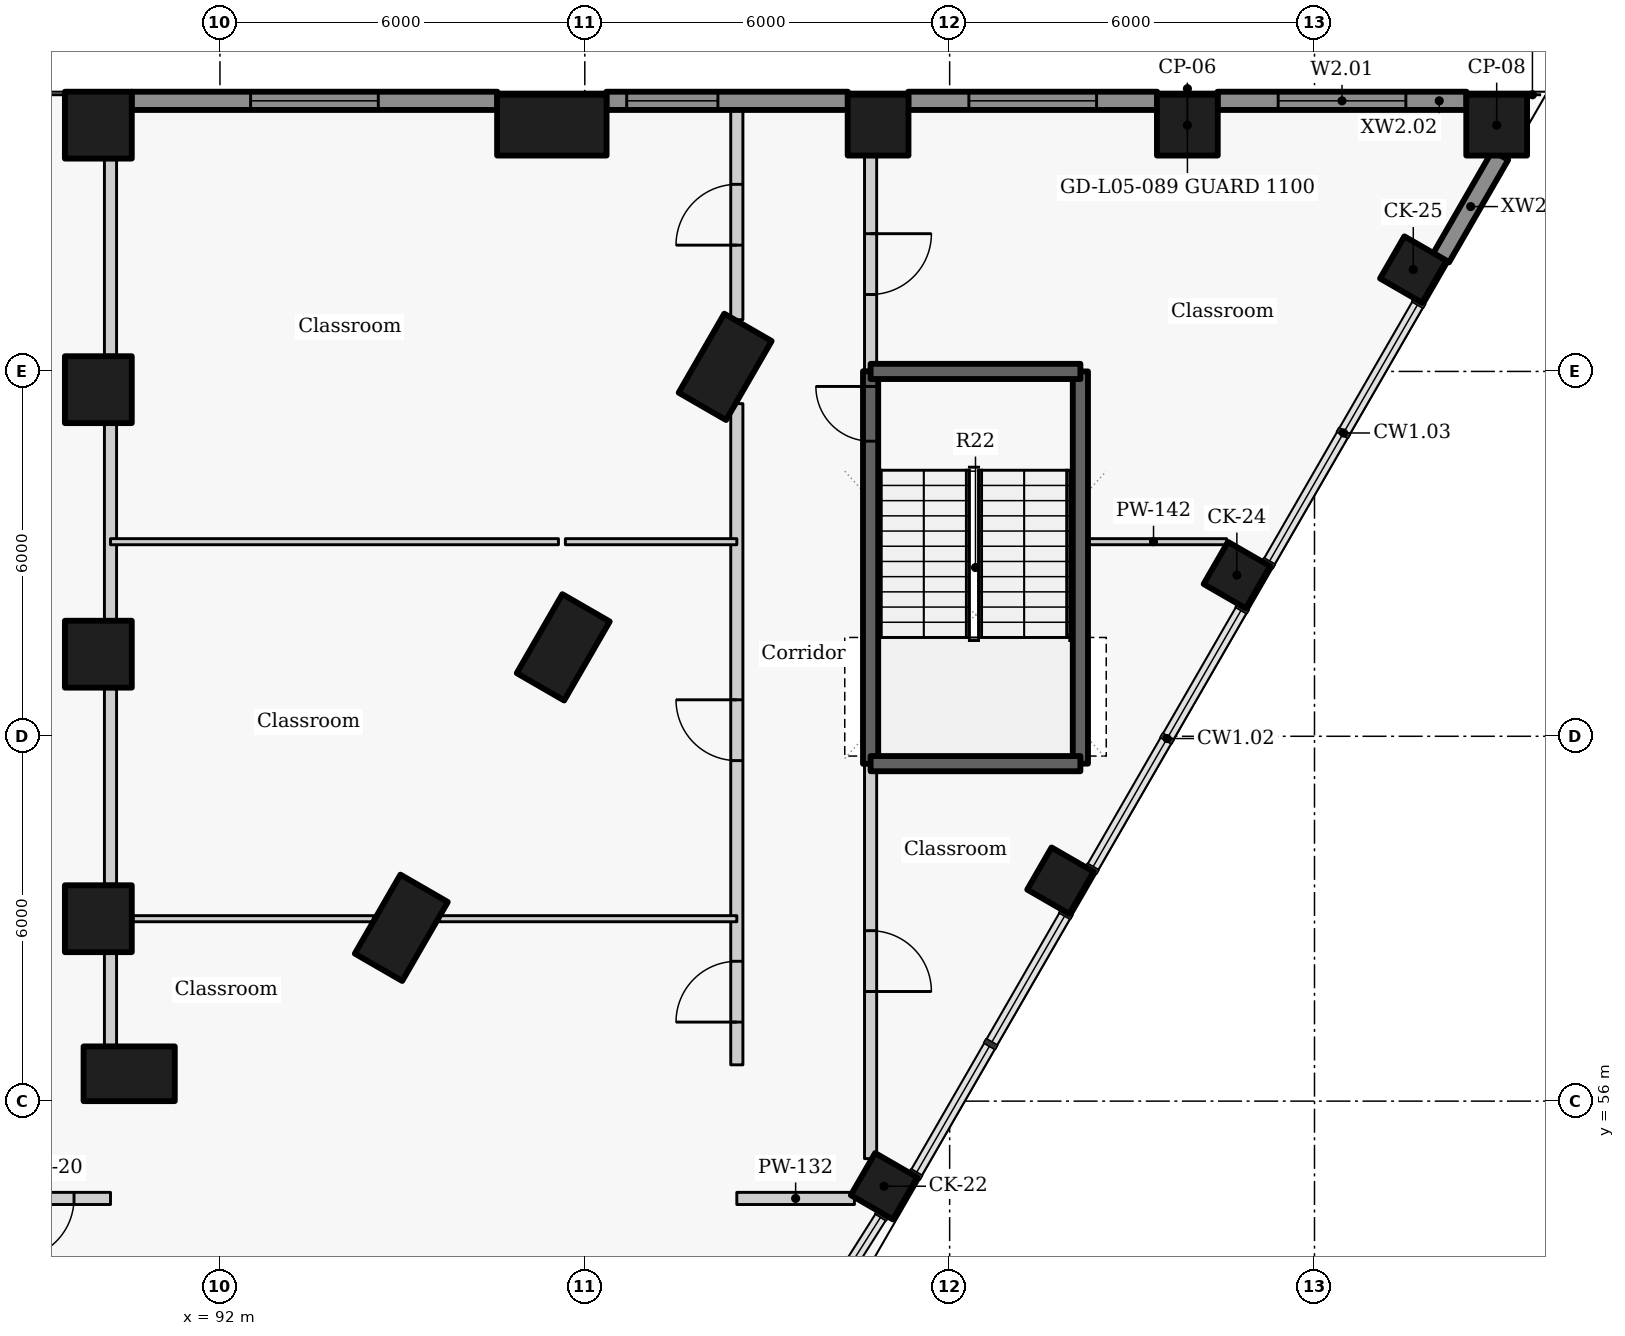
"""IFC4 building model, lengths in metres.
Left out: names, types, materials, properties, quantities, classifications, styles, units other than length and angle.
Written with IfcOpenShell. Run it as: python <this file> out.ifc"""

import sys

from ifc_helpers import new_model, si_unit, direction, frame, frame_2d, origin, origin_2d, place, context, subcontext, project, spatial, rectangle, extrude, element, fill, save


model = new_model("IFC4")
c1 = context("Model", 3, precision=1e-05, world=origin(), true_north=direction((0.0, 1.0)))
c2 = subcontext(c1, "Body", "Model", "MODEL_VIEW")
j1 = project(units=[si_unit("LENGTHUNIT", "METRE"), si_unit("PLANEANGLEUNIT", "RADIAN")], contexts=[c1])
p1 = place(None, origin())
s1 = spatial("IfcSite", under=j1, at=p1, CompositionType="ELEMENT")
p2 = place(p1, origin())
s2 = spatial("IfcBuilding", under=s1, at=p2, CompositionType="ELEMENT")
p3 = place(p2, frame((0.0, 0.0, 24.0)))
s3 = spatial("IfcBuildingStorey", under=s2, at=p3, CompositionType="ELEMENT", Elevation=24.0)
for number, where, z_axis, x_axis in (
    (1, (90.507, 56.45, 0.0), (0.0, 0.0, 1.0), (1.0, 0.0, 0.0)),
    (2, (94.982, 58.851, 0.0), (0.0, 0.0, 1.0), (0.5, 0.866, 0.0)),
    (3, (97.646, 63.463, 0.0), (0.0, 0.0, 1.0), (0.5, 0.866, 0.0)),
    (4, (100.308, 68.075, 0.0), (0.0, 0.0, 1.0), (0.5, 0.866, 0.0)),
):
    element("IfcColumn", number, at=place(p3, frame(where, z_axis=z_axis, x_axis=x_axis)), inside=s3, PredefinedType="COLUMN", context=c2, shape_type="SweptSolid", body=[
        extrude(rectangle(XDim=1.5, YDim=0.9, at=origin_2d()), origin(), (0.0, 0.0, 1.0), 4.2),
    ])
for number, where, z_axis, x_axis in (
    (5, (90.0, 59.0, 0.0), (0.0, 0.0, 1.0), (0.0, 1.0, 0.0)),
    (6, (90.0, 63.35, 0.0), (0.0, 0.0, 1.0), (0.0, 1.0, 0.0)),
    (7, (90.0, 67.7, 0.0), (0.0, 0.0, 1.0), (0.0, 1.0, 0.0)),
    (8, (90.0, 72.05, 0.0), (0.0, 0.0, 1.0), (0.0, 1.0, 0.0)),
):
    element("IfcColumn", number, at=place(p3, frame(where, z_axis=z_axis, x_axis=x_axis)), inside=s3, PredefinedType="COLUMN", context=c2, shape_type="SweptSolid", body=[
        extrude(rectangle(XDim=1.1, YDim=1.1, at=origin_2d()), origin(), (0.0, 0.0, 1.0), 4.2),
    ])
for number, where, z_axis, x_axis in (
    (9, (102.921, 54.6, 0.0), (0.0, 0.0, 1.0), (0.5, 0.866, 0.0)),
    (10, (105.822, 59.625, 0.0), (0.0, 0.0, 1.0), (0.5, 0.866, 0.0)),
    (11, (108.723, 64.65, 0.0), (0.0, 0.0, 1.0), (0.5, 0.866, 0.0)),
    (12, (111.625, 69.675, 0.0), (0.0, 0.0, 1.0), (0.5, 0.866, 0.0)),
):
    element("IfcColumn", number, at=place(p3, frame(where, z_axis=z_axis, x_axis=x_axis)), inside=s3, PredefinedType="COLUMN", context=c2, shape_type="SweptSolid", body=[
        extrude(rectangle(XDim=0.8, YDim=0.8, at=origin_2d()), origin(), (0.0, 0.0, 1.0), 4.2),
    ])
p4 = place(p3, frame((97.458, 72.05, 0.0), z_axis=(0.0, 0.0, 1.0), x_axis=(1.0, 0.0, 0.0)))
e13 = element("IfcColumn", 13, at=p4, inside=s3, PredefinedType="COLUMN", context=c2, shape_type="SweptSolid", body=[
    extrude(rectangle(XDim=1.8, YDim=1.0, at=origin_2d()), origin(), (0.0, 0.0, 1.0), 4.2),
])
for number, where, z_axis, x_axis in (
    (14, (102.823, 72.05, 0.0), (0.0, 0.0, 1.0), (1.0, 0.0, 0.0)),
    (15, (107.909, 72.05, 0.0), (0.0, 0.0, 1.0), (1.0, 0.0, 0.0)),
    (16, (112.996, 72.05, 0.0), (0.0, 0.0, 1.0), (1.0, 0.0, 0.0)),
):
    element("IfcColumn", number, at=place(p3, frame(where, z_axis=z_axis, x_axis=x_axis)), inside=s3, PredefinedType="COLUMN", context=c2, shape_type="SweptSolid", body=[
        extrude(rectangle(XDim=1.0, YDim=1.0, at=origin_2d()), origin(), (0.0, 0.0, 1.0), 4.2),
    ])
p5 = place(p3, frame((112.082, 69.868, 0.0), z_axis=(0.0, 0.0, 1.0), x_axis=(0.500051850797, 0.865995465643, 0.0)))
e17 = element("IfcWall", 17, at=p5, inside=s3, PredefinedType="SOLIDWALL", context=c2, shape_type="SweptSolid", body=[
    extrude(rectangle(XDim=1.946, YDim=0.3, at=frame_2d((0.973, 0.0))), origin(), (0.0, 0.0, 1.0), 3.325),
])
p6 = place(p3, frame((112.5, 72.45, 0.0), z_axis=(0.0, 0.0, 1.0), x_axis=(-1.0, 0.0, 0.0)))
e18 = element("IfcWall", 18, at=p6, inside=s3, PredefinedType="SOLIDWALL", context=c2, shape_type="SweptSolid", body=[
    extrude(rectangle(XDim=4.095, YDim=0.3, at=frame_2d((2.047, 0.0))), origin(), (0.0, 0.0, 1.0), 3.325),
])
p7 = place(p6, frame((0.998, 0.0, 0.9)))
e19 = element("IfcOpeningElement", 19, at=p7, cuts=e18, PredefinedType="OPENING", context=c2, shape_type="SweptSolid", body=[
    extrude(rectangle(XDim=2.1, YDim=2.05, at=frame_2d((1.05, 1.025))), frame((0.0, 0.16, 0.0), z_axis=(0.0, -1.0, 0.0), x_axis=(1.0, 0.0, 0.0)), (0.0, 0.0, 1.0), 0.32),
])
p8 = place(p3, frame((107.413, 72.45, 0.0), z_axis=(0.0, 0.0, 1.0), x_axis=(-1.0, 0.0, 0.0)))
e20 = element("IfcWall", 20, at=p8, inside=s3, PredefinedType="SOLIDWALL", context=c2, shape_type="SweptSolid", body=[
    extrude(rectangle(XDim=4.094, YDim=0.3, at=frame_2d((2.047, 0.0))), origin(), (0.0, 0.0, 1.0), 3.325),
])
p9 = place(p8, frame((0.997, 0.0, 0.9)))
e21 = element("IfcOpeningElement", 21, at=p9, cuts=e20, PredefinedType="OPENING", context=c2, shape_type="SweptSolid", body=[
    extrude(rectangle(XDim=2.1, YDim=2.05, at=frame_2d((1.05, 1.025))), frame((0.0, 0.16, 0.0), z_axis=(0.0, -1.0, 0.0), x_axis=(1.0, 0.0, 0.0)), (0.0, 0.0, 1.0), 0.32),
])
p10 = place(p3, frame((102.327, 72.45, 0.0), z_axis=(0.0, 0.0, 1.0), x_axis=(-1.0, 0.0, 0.0)))
e22 = element("IfcWall", 22, at=p10, inside=s3, PredefinedType="SOLIDWALL", context=c2, shape_type="SweptSolid", body=[
    extrude(rectangle(XDim=3.973, YDim=0.3, at=frame_2d((1.986, 0.0))), origin(), (0.0, 0.0, 1.0), 3.325),
])
p11 = place(p10, frame((2.138, 0.0, 0.9)))
e23 = element("IfcOpeningElement", 23, at=p11, cuts=e22, PredefinedType="OPENING", context=c2, shape_type="SweptSolid", body=[
    extrude(rectangle(XDim=1.5, YDim=2.05, at=frame_2d((0.75, 1.025))), frame((0.0, 0.16, 0.0), z_axis=(0.0, -1.0, 0.0), x_axis=(1.0, 0.0, 0.0)), (0.0, 0.0, 1.0), 0.32),
])
p12 = place(p3, frame((96.562, 72.45, 0.0), z_axis=(0.0, 0.0, 1.0), x_axis=(-1.0, 0.0, 0.0)))
e24 = element("IfcWall", 24, at=p12, inside=s3, PredefinedType="SOLIDWALL", context=c2, shape_type="SweptSolid", body=[
    extrude(rectangle(XDim=6.016, YDim=0.3, at=frame_2d((3.008, 0.0))), origin(), (0.0, 0.0, 1.0), 3.325),
])
p13 = place(p12, frame((1.958, 0.0, 0.9)))
e25 = element("IfcOpeningElement", 25, at=p13, cuts=e24, PredefinedType="OPENING", context=c2, shape_type="SweptSolid", body=[
    extrude(rectangle(XDim=2.1, YDim=2.05, at=frame_2d((1.05, 1.025))), frame((0.0, 0.16, 0.0), z_axis=(0.0, -1.0, 0.0), x_axis=(1.0, 0.0, 0.0)), (0.0, 0.0, 1.0), 0.32),
])
p14 = place(p3, frame((102.7, 61.547, -0.3), z_axis=(0.0, 0.0, 1.0), x_axis=(0.0, 1.0, 0.0)))
e26 = element("IfcWall", 26, at=p14, inside=s3, PredefinedType="SHEAR", context=c2, shape_type="SweptSolid", body=[
    extrude(rectangle(XDim=6.456, YDim=0.25, at=frame_2d((3.228, 0.0))), origin(), (0.0, 0.0, 1.0), 4.225),
])
p15 = place(p14, frame((5.306, 0.0, 0.3)))
e27 = element("IfcOpeningElement", 27, at=p15, cuts=e26, PredefinedType="OPENING", context=c2, shape_type="SweptSolid", body=[
    extrude(rectangle(XDim=0.9, YDim=2.1, at=frame_2d((0.45, 1.05))), frame((0.0, 0.135, 0.0), z_axis=(0.0, -1.0, 0.0), x_axis=(1.0, 0.0, 0.0)), (0.0, 0.0, 1.0), 0.27),
])
p16 = place(p3, frame((102.7, 61.553, 0.0), z_axis=(0.0, 0.0, 1.0), x_axis=(0.0, -1.0, 0.0)))
e28 = element("IfcWall", 28, at=p16, inside=s3, PredefinedType="PARTITIONING", context=c2, shape_type="SweptSolid", body=[
    extrude(rectangle(XDim=6.499, YDim=0.2, at=frame_2d((3.249, 0.0))), origin(), (0.0, 0.0, 1.0), 3.925),
])
p17 = place(p16, frame((2.75, 0.0, 0.0)))
e29 = element("IfcOpeningElement", 29, at=p17, cuts=e28, PredefinedType="OPENING", context=c2, shape_type="SweptSolid", body=[
    extrude(rectangle(XDim=1.0, YDim=2.1, at=frame_2d((0.5, 1.05))), frame((0.0, 0.11, 0.0), z_axis=(0.0, -1.0, 0.0), x_axis=(1.0, 0.0, 0.0)), (0.0, 0.0, 1.0), 0.22),
])
p18 = place(p3, frame((102.7, 71.533, 0.0), z_axis=(0.0, 0.0, 1.0), x_axis=(0.0, -1.0, 0.0)))
e30 = element("IfcWall", 30, at=p18, inside=s3, PredefinedType="PARTITIONING", context=c2, shape_type="SweptSolid", body=[
    extrude(rectangle(XDim=3.536, YDim=0.2, at=frame_2d((1.768, 0.0))), origin(), (0.0, 0.0, 1.0), 3.925),
])
p19 = place(p18, frame((1.268, 0.0, 0.0)))
e31 = element("IfcOpeningElement", 31, at=p19, cuts=e30, PredefinedType="OPENING", context=c2, shape_type="SweptSolid", body=[
    extrude(rectangle(XDim=1.0, YDim=2.1, at=frame_2d((0.5, 1.05))), frame((0.0, 0.11, 0.0), z_axis=(0.0, -1.0, 0.0), x_axis=(1.0, 0.0, 0.0)), (0.0, 0.0, 1.0), 0.22),
])
p20 = place(p3, frame((100.5, 56.597, 0.0), z_axis=(0.0, 0.0, 1.0), x_axis=(0.0, 1.0, 0.0)))
e32 = element("IfcWall", 32, at=p20, inside=s3, PredefinedType="PARTITIONING", context=c2, shape_type="SweptSolid", body=[
    extrude(rectangle(XDim=10.873, YDim=0.2, at=frame_2d((5.437, 0.0))), origin(), (0.0, 0.0, 1.0), 3.925),
])
p21 = place(p20, frame((5.003, 0.0, 0.0)))
e33 = element("IfcOpeningElement", 33, at=p21, cuts=e32, PredefinedType="OPENING", context=c2, shape_type="SweptSolid", body=[
    extrude(rectangle(XDim=1.0, YDim=2.1, at=frame_2d((0.5, 1.05))), frame((0.0, 0.11, 0.0), z_axis=(0.0, -1.0, 0.0), x_axis=(1.0, 0.0, 0.0)), (0.0, 0.0, 1.0), 0.22),
])
p22 = place(p20, frame((0.703, 0.0, 0.0)))
e34 = element("IfcOpeningElement", 34, at=p22, cuts=e32, PredefinedType="OPENING", context=c2, shape_type="SweptSolid", body=[
    extrude(rectangle(XDim=1.0, YDim=2.1, at=frame_2d((0.5, 1.05))), frame((0.0, 0.11, 0.0), z_axis=(0.0, -1.0, 0.0), x_axis=(1.0, 0.0, 0.0)), (0.0, 0.0, 1.0), 0.22),
])
p23 = place(p3, frame((100.5, 68.851, 0.0), z_axis=(0.0, 0.0, 1.0), x_axis=(0.0, 1.0, 0.0)))
e35 = element("IfcWall", 35, at=p23, inside=s3, PredefinedType="PARTITIONING", context=c2, shape_type="SweptSolid", body=[
    extrude(rectangle(XDim=3.449, YDim=0.2, at=frame_2d((1.725, 0.0))), origin(), (0.0, 0.0, 1.0), 3.405),
])
p24 = place(p23, frame((1.226, 0.0, 0.0)))
e36 = element("IfcOpeningElement", 36, at=p24, cuts=e35, PredefinedType="OPENING", context=c2, shape_type="SweptSolid", body=[
    extrude(rectangle(XDim=1.0, YDim=2.1, at=frame_2d((0.5, 1.05))), frame((0.0, 0.11, 0.0), z_axis=(0.0, -1.0, 0.0), x_axis=(1.0, 0.0, 0.0)), (0.0, 0.0, 1.0), 0.22),
])
p25 = place(p3, frame((90.2, 56.917, 0.0), z_axis=(0.0, 0.0, 1.0), x_axis=(0.0, 1.0, 0.0)))
e37 = element("IfcWall", 37, at=p25, inside=s3, PredefinedType="PARTITIONING", context=c2, shape_type="SweptSolid", body=[
    extrude(rectangle(XDim=1.516, YDim=0.2, at=frame_2d((0.758, 0.0))), origin(), (0.0, 0.0, 1.0), 3.925),
])
for number, where, z_axis, x_axis in (
    (38, (90.2, 59.567, 0.0), (0.0, 0.0, 1.0), (0.0, 1.0, 0.0)),
    (39, (90.2, 63.917, 0.0), (0.0, 0.0, 1.0), (0.0, 1.0, 0.0)),
):
    element("IfcWall", number, at=place(p3, frame(where, z_axis=z_axis, x_axis=x_axis)), inside=s3, PredefinedType="PARTITIONING", context=c2, shape_type="SweptSolid", body=[
        extrude(rectangle(XDim=3.216, YDim=0.2, at=frame_2d((1.608, 0.0))), origin(), (0.0, 0.0, 1.0), 3.405),
    ])
p26 = place(p3, frame((90.2, 68.267, 0.0), z_axis=(0.0, 0.0, 1.0), x_axis=(0.0, 1.0, 0.0)))
e40 = element("IfcWall", 40, at=p26, inside=s3, PredefinedType="PARTITIONING", context=c2, shape_type="SweptSolid", body=[
    extrude(rectangle(XDim=3.216, YDim=0.2, at=frame_2d((1.608, 0.0))), origin(), (0.0, 0.0, 1.0), 3.405),
])
p27 = place(p3, frame((106.15, 61.55, -0.3), z_axis=(0.0, 0.0, 1.0), x_axis=(0.0, 1.0, 0.0)))
e41 = element("IfcWall", 41, at=p27, inside=s3, PredefinedType="SHEAR", context=c2, shape_type="SweptSolid", body=[
    extrude(rectangle(XDim=6.45, YDim=0.25, at=frame_2d((3.225, 0.0))), origin(), (0.0, 0.0, 1.0), 4.225),
])
p28 = place(p3, frame((90.2, 54.4, 0.0), z_axis=(0.0, 0.0, 1.0), x_axis=(-1.0, 0.0, 0.0)))
e42 = element("IfcWall", 42, at=p28, inside=s3, PredefinedType="PARTITIONING", context=c2, shape_type="SweptSolid", body=[
    extrude(rectangle(XDim=20.4, YDim=0.2, at=frame_2d((10.2, 0.0))), origin(), (0.0, 0.0, 1.0), 3.925),
])
p29 = place(p28, frame((18.8, 0.0, 0.0)))
e43 = element("IfcOpeningElement", 43, at=p29, cuts=e42, PredefinedType="OPENING", context=c2, shape_type="SweptSolid", body=[
    extrude(rectangle(XDim=1.0, YDim=2.1, at=frame_2d((0.5, 1.05))), frame((0.0, 0.11, 0.0), z_axis=(0.0, -1.0, 0.0), x_axis=(1.0, 0.0, 0.0)), (0.0, 0.0, 1.0), 0.22),
])
p30 = place(p28, frame((0.6, 0.0, 0.0)))
e44 = element("IfcOpeningElement", 44, at=p30, cuts=e42, PredefinedType="OPENING", context=c2, shape_type="SweptSolid", body=[
    extrude(rectangle(XDim=1.0, YDim=2.1, at=frame_2d((0.5, 1.05))), frame((0.0, 0.11, 0.0), z_axis=(0.0, -1.0, 0.0), x_axis=(1.0, 0.0, 0.0)), (0.0, 0.0, 1.0), 0.22),
])
p31 = place(p28, frame((10.1, 0.0, 0.0)))
e45 = element("IfcOpeningElement", 45, at=p31, cuts=e42, PredefinedType="OPENING", context=c2, shape_type="SweptSolid", body=[
    extrude(rectangle(XDim=1.0, YDim=2.1, at=frame_2d((0.5, 1.05))), frame((0.0, 0.11, 0.0), z_axis=(0.0, -1.0, 0.0), x_axis=(1.0, 0.0, 0.0)), (0.0, 0.0, 1.0), 0.22),
])
p32 = place(p3, frame((100.5, 54.4, 0.0), z_axis=(0.0, 0.0, 1.0), x_axis=(1.0, 0.0, 0.0)))
e46 = element("IfcWall", 46, at=p32, inside=s3, PredefinedType="PARTITIONING", context=c2, shape_type="SweptSolid", body=[
    extrude(rectangle(XDim=1.934, YDim=0.2, at=frame_2d((0.967, 0.0))), origin(), (0.0, 0.0, 1.0), 3.925),
])
for number, where, z_axis, x_axis in (
    (47, (102.7, 68.0, -0.3), (0.0, 0.0, 1.0), (1.0, 0.0, 0.0)),
    (48, (102.7, 61.55, -0.3), (0.0, 0.0, 1.0), (1.0, 0.0, 0.0)),
):
    element("IfcWall", number, at=place(p3, frame(where, z_axis=z_axis, x_axis=x_axis)), inside=s3, PredefinedType="SHEAR", context=c2, shape_type="SweptSolid", body=[
        extrude(rectangle(XDim=3.45, YDim=0.25, at=frame_2d((1.725, 0.0))), origin(), (0.0, 0.0, 1.0), 4.225),
    ])
p33 = place(p3, frame((90.2, 65.2, 0.0), z_axis=(0.0, 0.0, 1.0), x_axis=(1.0, 0.0, 0.0)))
e49 = element("IfcWall", 49, at=p33, inside=s3, PredefinedType="PARTITIONING", context=c2, shape_type="SweptSolid", body=[
    extrude(rectangle(XDim=7.366, YDim=0.1, at=frame_2d((3.683, 0.0))), origin(), (0.0, 0.0, 1.0), 3.925),
])
p34 = place(p3, frame((97.68, 65.2, 0.0), z_axis=(0.0, 0.0, 1.0), x_axis=(1.0, 0.0, 0.0)))
e50 = element("IfcWall", 50, at=p34, inside=s3, PredefinedType="PARTITIONING", context=c2, shape_type="SweptSolid", body=[
    extrude(rectangle(XDim=2.82, YDim=0.1, at=frame_2d((1.41, 0.0))), origin(), (0.0, 0.0, 1.0), 3.305),
])
p35 = place(p3, frame((106.15, 65.2, 0.0), z_axis=(0.0, 0.0, 1.0), x_axis=(1.0, 0.0, 0.0)))
e51 = element("IfcWall", 51, at=p35, inside=s3, PredefinedType="PARTITIONING", context=c2, shape_type="SweptSolid", body=[
    extrude(rectangle(XDim=2.406, YDim=0.1, at=frame_2d((1.203, 0.0))), origin(), (0.0, 0.0, 1.0), 3.925),
])
p36 = place(p3, frame((90.57, 59.0, 0.0), z_axis=(0.0, 0.0, 1.0), x_axis=(1.0, 0.0, 0.0)))
e52 = element("IfcWall", 52, at=p36, inside=s3, PredefinedType="PARTITIONING", context=c2, shape_type="SweptSolid", body=[
    extrude(rectangle(XDim=3.956, YDim=0.1, at=frame_2d((1.978, 0.0))), origin(), (0.0, 0.0, 1.0), 3.925),
])
p37 = place(p3, frame((95.612, 59.0, 0.0), z_axis=(0.0, 0.0, 1.0), x_axis=(1.0, 0.0, 0.0)))
e53 = element("IfcWall", 53, at=p37, inside=s3, PredefinedType="PARTITIONING", context=c2, shape_type="SweptSolid", body=[
    extrude(rectangle(XDim=4.888, YDim=0.1, at=frame_2d((2.444, 0.0))), origin(), (0.0, 0.0, 1.0), 3.925),
])
p38 = place(p7, origin())
e54 = element("IfcWindow", 54, at=p38, inside=s3, PartitioningType="SINGLE_PANEL", PredefinedType="WINDOW", context=c2, shape_type="SweptSolid", body=[
    extrude(rectangle(XDim=2.1, YDim=2.05, at=frame_2d((1.05, 1.025))), frame((0.0, 0.03, 0.0), z_axis=(0.0, -1.0, 0.0), x_axis=(1.0, 0.0, 0.0)), (0.0, 0.0, 1.0), 0.06),
])
fill(e19, e54)
p39 = place(p9, origin())
e55 = element("IfcWindow", 55, at=p39, inside=s3, PartitioningType="SINGLE_PANEL", PredefinedType="WINDOW", context=c2, shape_type="SweptSolid", body=[
    extrude(rectangle(XDim=2.1, YDim=2.05, at=frame_2d((1.05, 1.025))), frame((0.0, 0.03, 0.0), z_axis=(0.0, -1.0, 0.0), x_axis=(1.0, 0.0, 0.0)), (0.0, 0.0, 1.0), 0.06),
])
fill(e21, e55)
p40 = place(p11, origin())
e56 = element("IfcWindow", 56, at=p40, inside=s3, PartitioningType="SINGLE_PANEL", PredefinedType="WINDOW", context=c2, shape_type="SweptSolid", body=[
    extrude(rectangle(XDim=1.5, YDim=2.05, at=frame_2d((0.75, 1.025))), frame((0.0, 0.03, 0.0), z_axis=(0.0, -1.0, 0.0), x_axis=(1.0, 0.0, 0.0)), (0.0, 0.0, 1.0), 0.06),
])
fill(e23, e56)
p41 = place(p13, origin())
e57 = element("IfcWindow", 57, at=p41, inside=s3, PartitioningType="SINGLE_PANEL", PredefinedType="WINDOW", context=c2, shape_type="SweptSolid", body=[
    extrude(rectangle(XDim=2.1, YDim=2.05, at=frame_2d((1.05, 1.025))), frame((0.0, 0.03, 0.0), z_axis=(0.0, -1.0, 0.0), x_axis=(1.0, 0.0, 0.0)), (0.0, 0.0, 1.0), 0.06),
])
fill(e25, e57)
p42 = place(p15, origin())
e58 = element("IfcDoor", 58, at=p42, inside=s3, OperationType="SINGLE_SWING_RIGHT", PredefinedType="DOOR", context=c2, shape_type="SweptSolid", body=[
    extrude(rectangle(XDim=0.9, YDim=2.1, at=frame_2d((0.45, 1.05))), frame((0.0, 0.025, 0.0), z_axis=(0.0, -1.0, 0.0), x_axis=(1.0, 0.0, 0.0)), (0.0, 0.0, 1.0), 0.05),
])
fill(e27, e58)
p43 = place(p19, origin())
e59 = element("IfcDoor", 59, at=p43, inside=s3, OperationType="SINGLE_SWING_LEFT", PredefinedType="DOOR", context=c2, shape_type="SweptSolid", body=[
    extrude(rectangle(XDim=1.0, YDim=2.1, at=frame_2d((0.5, 1.05))), frame((0.0, 0.025, 0.0), z_axis=(0.0, -1.0, 0.0), x_axis=(1.0, 0.0, 0.0)), (0.0, 0.0, 1.0), 0.05),
])
fill(e31, e59)
p44 = place(p17, origin())
e60 = element("IfcDoor", 60, at=p44, inside=s3, OperationType="SINGLE_SWING_RIGHT", PredefinedType="DOOR", context=c2, shape_type="SweptSolid", body=[
    extrude(rectangle(XDim=1.0, YDim=2.1, at=frame_2d((0.5, 1.05))), frame((0.0, 0.025, 0.0), z_axis=(0.0, -1.0, 0.0), x_axis=(1.0, 0.0, 0.0)), (0.0, 0.0, 1.0), 0.05),
])
fill(e29, e60)
p45 = place(p24, origin())
e61 = element("IfcDoor", 61, at=p45, inside=s3, OperationType="SINGLE_SWING_LEFT", PredefinedType="DOOR", context=c2, shape_type="SweptSolid", body=[
    extrude(rectangle(XDim=1.0, YDim=2.1, at=frame_2d((0.5, 1.05))), frame((0.0, 0.025, 0.0), z_axis=(0.0, -1.0, 0.0), x_axis=(1.0, 0.0, 0.0)), (0.0, 0.0, 1.0), 0.05),
])
fill(e36, e61)
p46 = place(p21, origin())
e62 = element("IfcDoor", 62, at=p46, inside=s3, OperationType="SINGLE_SWING_RIGHT", PredefinedType="DOOR", context=c2, shape_type="SweptSolid", body=[
    extrude(rectangle(XDim=1.0, YDim=2.1, at=frame_2d((0.5, 1.05))), frame((0.0, 0.025, 0.0), z_axis=(0.0, -1.0, 0.0), x_axis=(1.0, 0.0, 0.0)), (0.0, 0.0, 1.0), 0.05),
])
fill(e33, e62)
p47 = place(p22, origin())
e63 = element("IfcDoor", 63, at=p47, inside=s3, OperationType="SINGLE_SWING_LEFT", PredefinedType="DOOR", context=c2, shape_type="SweptSolid", body=[
    extrude(rectangle(XDim=1.0, YDim=2.1, at=frame_2d((0.5, 1.05))), frame((0.0, 0.025, 0.0), z_axis=(0.0, -1.0, 0.0), x_axis=(1.0, 0.0, 0.0)), (0.0, 0.0, 1.0), 0.05),
])
fill(e34, e63)
p48 = place(p30, origin())
e64 = element("IfcDoor", 64, at=p48, inside=s3, OperationType="SINGLE_SWING_RIGHT", PredefinedType="DOOR", context=c2, shape_type="SweptSolid", body=[
    extrude(rectangle(XDim=1.0, YDim=2.1, at=frame_2d((0.5, 1.05))), frame((0.0, 0.025, 0.0), z_axis=(0.0, -1.0, 0.0), x_axis=(1.0, 0.0, 0.0)), (0.0, 0.0, 1.0), 0.05),
])
fill(e44, e64)
save(model, sys.argv[1])
